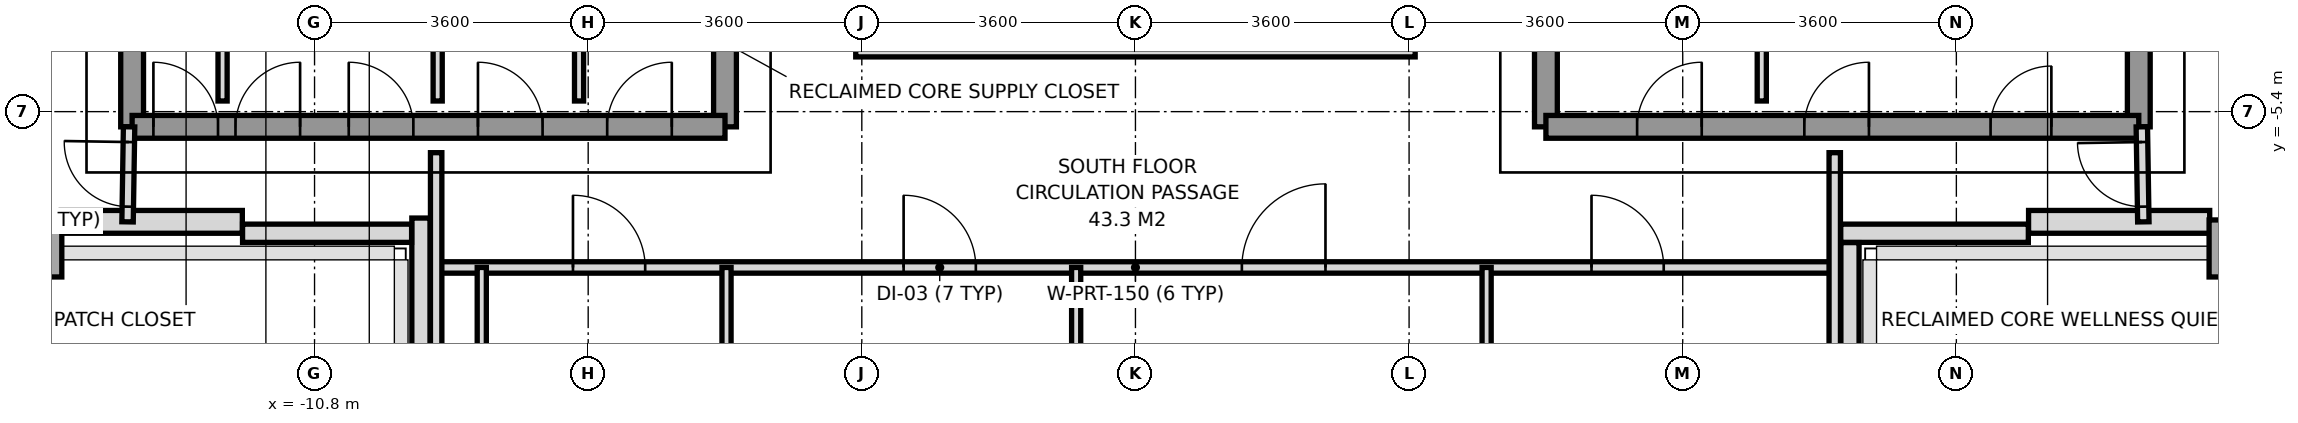
"""IFC4 building model, lengths in metres.
Left out: names, types, materials, properties, quantities, classifications, styles, units other than length and angle.
Written with IfcOpenShell. Run it as: python <this file> out.ifc"""

import sys

from ifc_helpers import new_model, si_unit, direction, frame, frame_2d, origin, origin_2d, place, context, subcontext, project, spatial, rectangle, extrude, source, transform, mapped, element, fill, save


model = new_model("IFC4")
c1 = context("Model", 3, precision=1e-05, world=origin(), true_north=direction((0.0, 1.0)))
c2 = subcontext(c1, "Body", "Model", "MODEL_VIEW")
j1 = project(units=[si_unit("LENGTHUNIT", "METRE"), si_unit("PLANEANGLEUNIT", "RADIAN")], contexts=[c1])
p1 = place(None, origin())
s1 = spatial("IfcSite", under=j1, at=p1, CompositionType="ELEMENT")
p2 = place(p1, origin())
s2 = spatial("IfcBuilding", under=s1, at=p2, CompositionType="ELEMENT")
p3 = place(p2, frame((0.0, 0.0, 223.6)))
s3 = spatial("IfcBuildingStorey", under=s2, at=p3, CompositionType="ELEMENT", Elevation=223.6)
m1 = source(origin(), c2, "Body", "SweptSolid", [
    extrude(rectangle(XDim=0.55, YDim=0.75, at=origin_2d()), origin(), (0.0, 0.0, 1.0), 3.01),
])
for number, where, z_axis, x_axis in (
    (1, (-14.4, -7.2, 0.0), (0.0, 0.0, 1.0), (1.0, 0.0, 0.0)),
    (2, (14.4, -7.2, 0.0), (0.0, 0.0, 1.0), (1.0, 0.0, 0.0)),
):
    element("IfcColumn", number, at=place(p3, frame(where, z_axis=z_axis, x_axis=x_axis)), inside=s3, PredefinedType="COLUMN", context=c2, shape_type="MappedRepresentation", body=[
        mapped(m1, transform((0.0, 0.0, 0.0), x_axis=(1.0, 0.0, 0.0), y_axis=(0.0, 1.0, 0.0), z_axis=(0.0, 0.0, 1.0), scale=1.0)),
    ])
for number, where, z_axis, x_axis in (
    (3, (-14.133, -6.85, 0.0), (0.0, 0.0, 1.0), (1.0, 0.0, 0.0)),
    (4, (11.75, -6.85, 0.0), (0.0, 0.0, 1.0), (1.0, 0.0, 0.0)),
):
    element("IfcWall", number, at=place(p3, frame(where, z_axis=z_axis, x_axis=x_axis)), inside=s3, PredefinedType="SOLIDWALL", context=c2, shape_type="SweptSolid", body=[
        extrude(rectangle(XDim=2.383, YDim=0.3, at=frame_2d((1.191, 0.0))), origin(), (0.0, 0.0, 1.0), 2.57),
    ])
p4 = place(p3, frame((11.747, -7.0, 0.0), z_axis=(0.0, 0.0, 1.0), x_axis=(-1.0, 0.0, 0.0)))
e5 = element("IfcWall", 5, at=p4, inside=s3, PredefinedType="PARAPET", context=c2, shape_type="SweptSolid", body=[
    extrude(rectangle(XDim=2.469, YDim=0.24, at=frame_2d((1.234, 0.0))), origin(), (0.0, 0.0, 1.0), 1.15),
])
p5 = place(p3, frame((9.4, -7.123, 0.0), z_axis=(0.0, 0.0, 1.0), x_axis=(0.0, -1.0, 0.0)))
e6 = element("IfcWall", 6, at=p5, inside=s3, PredefinedType="PARAPET", context=c2, shape_type="SweptSolid", body=[
    extrude(rectangle(XDim=1.499, YDim=0.24, at=frame_2d((0.75, 0.0))), origin(), (0.0, 0.0, 1.0), 1.15),
])
p6 = place(p3, frame((-9.4, -8.622, 0.0), z_axis=(0.0, 0.0, 1.0), x_axis=(0.0, 1.0, 0.0)))
e7 = element("IfcWall", 7, at=p6, inside=s3, PredefinedType="PARAPET", context=c2, shape_type="SweptSolid", body=[
    extrude(rectangle(XDim=1.822, YDim=0.24, at=frame_2d((0.911, 0.0))), origin(), (0.0, 0.0, 1.0), 1.15),
])
p7 = place(p3, frame((-9.523, -7.0, 0.0), z_axis=(0.0, 0.0, 1.0), x_axis=(-1.0, 0.0, 0.0)))
e8 = element("IfcWall", 8, at=p7, inside=s3, PredefinedType="PARAPET", context=c2, shape_type="SweptSolid", body=[
    extrude(rectangle(XDim=2.224, YDim=0.24, at=frame_2d((1.112, 0.0))), origin(), (0.0, 0.0, 1.0), 1.15),
])
p8 = place(p3, frame((-13.2, -5.6, 0.0), z_axis=(0.0, 0.0, 1.0), x_axis=(0.0, 1.0, 0.0)))
e9 = element("IfcWall", 9, at=p8, inside=s3, PredefinedType="SHEAR", context=c2, shape_type="SweptSolid", body=[
    extrude(rectangle(XDim=11.2, YDim=0.3, at=frame_2d((5.6, 0.0))), origin(), (0.0, 0.0, 1.0), 3.01),
])
p9 = place(p3, frame((-5.4, -5.6, 0.0), z_axis=(0.0, 0.0, 1.0), x_axis=(0.0, 1.0, 0.0)))
e10 = element("IfcWall", 10, at=p9, inside=s3, PredefinedType="SHEAR", context=c2, shape_type="SweptSolid", body=[
    extrude(rectangle(XDim=12.5, YDim=0.3, at=frame_2d((6.25, 0.0))), origin(), (0.0, 0.0, 1.0), 3.01),
])
p10 = place(p9, frame((4.55, 0.0, 0.0)))
e11 = element("IfcOpeningElement", 11, at=p10, cuts=e10, PredefinedType="OPENING", context=c2, shape_type="SweptSolid", body=[
    extrude(rectangle(XDim=1.2, YDim=2.2, at=frame_2d((0.6, 1.1))), frame((0.0, 0.16, 0.0), z_axis=(0.0, -1.0, 0.0), x_axis=(1.0, 0.0, 0.0)), (0.0, 0.0, 1.0), 0.32),
])
p11 = place(p9, frame((10.45, 0.0, 0.0)))
e12 = element("IfcOpeningElement", 12, at=p11, cuts=e10, PredefinedType="OPENING", context=c2, shape_type="SweptSolid", body=[
    extrude(rectangle(XDim=1.2, YDim=2.2, at=frame_2d((0.6, 1.1))), frame((0.0, 0.16, 0.0), z_axis=(0.0, -1.0, 0.0), x_axis=(1.0, 0.0, 0.0)), (0.0, 0.0, 1.0), 0.32),
])
p12 = place(p9, frame((6.86, 0.0, 0.0)))
e13 = element("IfcOpeningElement", 13, at=p12, cuts=e10, PredefinedType="OPENING", context=c2, shape_type="SweptSolid", body=[
    extrude(rectangle(XDim=0.8, YDim=2.1, at=frame_2d((0.4, 1.05))), frame((0.0, 0.16, 0.0), z_axis=(0.0, -1.0, 0.0), x_axis=(1.0, 0.0, 0.0)), (0.0, 0.0, 1.0), 0.32),
])
p13 = place(p3, frame((-13.2, -5.6, 0.0), z_axis=(0.0, 0.0, 1.0), x_axis=(1.0, 0.0, 0.0)))
e14 = element("IfcWall", 14, at=p13, inside=s3, PredefinedType="SHEAR", context=c2, shape_type="SweptSolid", body=[
    extrude(rectangle(XDim=7.8, YDim=0.3, at=frame_2d((3.9, 0.0))), origin(), (0.0, 0.0, 1.0), 3.01),
])
p14 = place(p13, frame((0.28, 0.0, 0.0)))
e15 = element("IfcOpeningElement", 15, at=p14, cuts=e14, PredefinedType="OPENING", context=c2, shape_type="SweptSolid", body=[
    extrude(rectangle(XDim=0.85, YDim=2.1, at=frame_2d((0.425, 1.05))), frame((0.0, 0.16, 0.0), z_axis=(0.0, -1.0, 0.0), x_axis=(1.0, 0.0, 0.0)), (0.0, 0.0, 1.0), 0.32),
])
p15 = place(p13, frame((1.36, 0.0, 0.0)))
e16 = element("IfcOpeningElement", 16, at=p15, cuts=e14, PredefinedType="OPENING", context=c2, shape_type="SweptSolid", body=[
    extrude(rectangle(XDim=0.85, YDim=2.1, at=frame_2d((0.425, 1.05))), frame((0.0, 0.16, 0.0), z_axis=(0.0, -1.0, 0.0), x_axis=(1.0, 0.0, 0.0)), (0.0, 0.0, 1.0), 0.32),
])
p16 = place(p13, frame((2.85, 0.0, 0.0)))
e17 = element("IfcOpeningElement", 17, at=p16, cuts=e14, PredefinedType="OPENING", context=c2, shape_type="SweptSolid", body=[
    extrude(rectangle(XDim=0.85, YDim=2.1, at=frame_2d((0.425, 1.05))), frame((0.0, 0.16, 0.0), z_axis=(0.0, -1.0, 0.0), x_axis=(1.0, 0.0, 0.0)), (0.0, 0.0, 1.0), 0.32),
])
p17 = place(p13, frame((4.55, 0.0, 0.0)))
e18 = element("IfcOpeningElement", 18, at=p17, cuts=e14, PredefinedType="OPENING", context=c2, shape_type="SweptSolid", body=[
    extrude(rectangle(XDim=0.85, YDim=2.1, at=frame_2d((0.425, 1.05))), frame((0.0, 0.16, 0.0), z_axis=(0.0, -1.0, 0.0), x_axis=(1.0, 0.0, 0.0)), (0.0, 0.0, 1.0), 0.32),
])
p18 = place(p13, frame((6.25, 0.0, 0.0)))
e19 = element("IfcOpeningElement", 19, at=p18, cuts=e14, PredefinedType="OPENING", context=c2, shape_type="SweptSolid", body=[
    extrude(rectangle(XDim=0.85, YDim=2.1, at=frame_2d((0.425, 1.05))), frame((0.0, 0.16, 0.0), z_axis=(0.0, -1.0, 0.0), x_axis=(1.0, 0.0, 0.0)), (0.0, 0.0, 1.0), 0.32),
])
p19 = place(p3, frame((13.2, -5.6, 0.0), z_axis=(0.0, 0.0, 1.0), x_axis=(0.0, 1.0, 0.0)))
e20 = element("IfcWall", 20, at=p19, inside=s3, PredefinedType="SHEAR", context=c2, shape_type="SweptSolid", body=[
    extrude(rectangle(XDim=11.2, YDim=0.3, at=frame_2d((5.6, 0.0))), origin(), (0.0, 0.0, 1.0), 3.01),
])
p20 = place(p3, frame((5.4, -5.6, 0.0), z_axis=(0.0, 0.0, 1.0), x_axis=(0.0, 1.0, 0.0)))
e21 = element("IfcWall", 21, at=p20, inside=s3, PredefinedType="SHEAR", context=c2, shape_type="SweptSolid", body=[
    extrude(rectangle(XDim=12.5, YDim=0.3, at=frame_2d((6.25, 0.0))), origin(), (0.0, 0.0, 1.0), 3.01),
])
p21 = place(p20, frame((4.55, 0.0, 0.0)))
e22 = element("IfcOpeningElement", 22, at=p21, cuts=e21, PredefinedType="OPENING", context=c2, shape_type="SweptSolid", body=[
    extrude(rectangle(XDim=1.2, YDim=2.2, at=frame_2d((0.6, 1.1))), frame((0.0, 0.16, 0.0), z_axis=(0.0, -1.0, 0.0), x_axis=(1.0, 0.0, 0.0)), (0.0, 0.0, 1.0), 0.32),
])
p22 = place(p20, frame((10.45, 0.0, 0.0)))
e23 = element("IfcOpeningElement", 23, at=p22, cuts=e21, PredefinedType="OPENING", context=c2, shape_type="SweptSolid", body=[
    extrude(rectangle(XDim=1.2, YDim=2.2, at=frame_2d((0.6, 1.1))), frame((0.0, 0.16, 0.0), z_axis=(0.0, -1.0, 0.0), x_axis=(1.0, 0.0, 0.0)), (0.0, 0.0, 1.0), 0.32),
])
p23 = place(p20, frame((6.86, 0.0, 0.0)))
e24 = element("IfcOpeningElement", 24, at=p23, cuts=e21, PredefinedType="OPENING", context=c2, shape_type="SweptSolid", body=[
    extrude(rectangle(XDim=0.8, YDim=2.1, at=frame_2d((0.4, 1.05))), frame((0.0, 0.16, 0.0), z_axis=(0.0, -1.0, 0.0), x_axis=(1.0, 0.0, 0.0)), (0.0, 0.0, 1.0), 0.32),
])
p24 = place(p20, frame((7.88, 0.0, 0.0)))
e25 = element("IfcOpeningElement", 25, at=p24, cuts=e21, PredefinedType="OPENING", context=c2, shape_type="SweptSolid", body=[
    extrude(rectangle(XDim=0.8, YDim=2.1, at=frame_2d((0.4, 1.05))), frame((0.0, 0.16, 0.0), z_axis=(0.0, -1.0, 0.0), x_axis=(1.0, 0.0, 0.0)), (0.0, 0.0, 1.0), 0.32),
])
p25 = place(p3, frame((5.4, -5.6, 0.0), z_axis=(0.0, 0.0, 1.0), x_axis=(1.0, 0.0, 0.0)))
e26 = element("IfcWall", 26, at=p25, inside=s3, PredefinedType="SHEAR", context=c2, shape_type="SweptSolid", body=[
    extrude(rectangle(XDim=7.8, YDim=0.3, at=frame_2d((3.9, 0.0))), origin(), (0.0, 0.0, 1.0), 3.01),
])
p26 = place(p25, frame((5.85, 0.0, 0.0)))
e27 = element("IfcOpeningElement", 27, at=p26, cuts=e26, PredefinedType="OPENING", context=c2, shape_type="SweptSolid", body=[
    extrude(rectangle(XDim=0.8, YDim=2.1, at=frame_2d((0.4, 1.05))), frame((0.0, 0.16, 0.0), z_axis=(0.0, -1.0, 0.0), x_axis=(1.0, 0.0, 0.0)), (0.0, 0.0, 1.0), 0.32),
])
p27 = place(p25, frame((1.2, 0.0, 0.0)))
e28 = element("IfcOpeningElement", 28, at=p27, cuts=e26, PredefinedType="OPENING", context=c2, shape_type="SweptSolid", body=[
    extrude(rectangle(XDim=0.85, YDim=2.1, at=frame_2d((0.425, 1.05))), frame((0.0, 0.16, 0.0), z_axis=(0.0, -1.0, 0.0), x_axis=(1.0, 0.0, 0.0)), (0.0, 0.0, 1.0), 0.32),
])
p28 = place(p25, frame((3.4, 0.0, 0.0)))
e29 = element("IfcOpeningElement", 29, at=p28, cuts=e26, PredefinedType="OPENING", context=c2, shape_type="SweptSolid", body=[
    extrude(rectangle(XDim=0.85, YDim=2.1, at=frame_2d((0.425, 1.05))), frame((0.0, 0.16, 0.0), z_axis=(0.0, -1.0, 0.0), x_axis=(1.0, 0.0, 0.0)), (0.0, 0.0, 1.0), 0.32),
])
for number, where, z_axis, x_axis in (
    (30, (-12.01, -5.26, 0.0), (0.0, 0.0, 1.0), (0.0, 1.0, 0.0)),
    (31, (-9.18, -5.26, 0.0), (0.0, 0.0, 1.0), (0.0, 1.0, 0.0)),
    (32, (-7.32, -5.26, 0.0), (0.0, 0.0, 1.0), (0.0, 1.0, 0.0)),
    (33, (8.24, -5.26, 0.0), (0.0, 0.0, 1.0), (0.0, 1.0, 0.0)),
):
    element("IfcWall", number, at=place(p3, frame(where, z_axis=z_axis, x_axis=x_axis)), inside=s3, PredefinedType="PARTITIONING", context=c2, shape_type="SweptSolid", body=[
        extrude(rectangle(XDim=2.94, YDim=0.12, at=frame_2d((1.47, 0.0))), origin(), (0.0, 0.0, 1.0), 3.01),
    ])
p29 = place(p3, frame((-9.2, -7.45, 0.0), z_axis=(0.0, 0.0, 1.0), x_axis=(1.0, 0.0, 0.0)))
e34 = element("IfcWall", 34, at=p29, inside=s3, PredefinedType="PARTITIONING", context=c2, shape_type="SweptSolid", body=[
    extrude(rectangle(XDim=18.4, YDim=0.15, at=frame_2d((9.2, 0.0))), origin(), (0.0, 0.0, 1.0), 2.57),
])
p30 = place(p29, frame((1.8, 0.0, 0.0)))
e35 = element("IfcOpeningElement", 35, at=p30, cuts=e34, PredefinedType="OPENING", context=c2, shape_type="SweptSolid", body=[
    extrude(rectangle(XDim=0.95, YDim=2.15, at=frame_2d((0.475, 1.075))), frame((0.0, 0.085, 0.0), z_axis=(0.0, -1.0, 0.0), x_axis=(1.0, 0.0, 0.0)), (0.0, 0.0, 1.0), 0.17),
])
p31 = place(p29, frame((6.15, 0.0, 0.0)))
e36 = element("IfcOpeningElement", 36, at=p31, cuts=e34, PredefinedType="OPENING", context=c2, shape_type="SweptSolid", body=[
    extrude(rectangle(XDim=0.95, YDim=2.15, at=frame_2d((0.475, 1.075))), frame((0.0, 0.085, 0.0), z_axis=(0.0, -1.0, 0.0), x_axis=(1.0, 0.0, 0.0)), (0.0, 0.0, 1.0), 0.17),
])
p32 = place(p29, frame((10.6, 0.0, 0.0)))
e37 = element("IfcOpeningElement", 37, at=p32, cuts=e34, PredefinedType="OPENING", context=c2, shape_type="SweptSolid", body=[
    extrude(rectangle(XDim=1.1, YDim=2.2, at=frame_2d((0.55, 1.1))), frame((0.0, 0.085, 0.0), z_axis=(0.0, -1.0, 0.0), x_axis=(1.0, 0.0, 0.0)), (0.0, 0.0, 1.0), 0.17),
])
p33 = place(p29, frame((15.2, 0.0, 0.0)))
e38 = element("IfcOpeningElement", 38, at=p33, cuts=e34, PredefinedType="OPENING", context=c2, shape_type="SweptSolid", body=[
    extrude(rectangle(XDim=0.95, YDim=2.15, at=frame_2d((0.475, 1.075))), frame((0.0, 0.085, 0.0), z_axis=(0.0, -1.0, 0.0), x_axis=(1.0, 0.0, 0.0)), (0.0, 0.0, 1.0), 0.17),
])
for number, where, z_axis, x_axis in (
    (39, (-9.2, -10.28, 0.0), (0.0, 0.0, 1.0), (0.0, 1.0, 0.0)),
    (40, (9.2, -10.28, 0.0), (0.0, 0.0, 1.0), (0.0, 1.0, 0.0)),
):
    element("IfcWall", number, at=place(p3, frame(where, z_axis=z_axis, x_axis=x_axis)), inside=s3, PredefinedType="PARTITIONING", context=c2, shape_type="SweptSolid", body=[
        extrude(rectangle(XDim=4.34, YDim=0.15, at=frame_2d((2.17, 0.0))), origin(), (0.0, 0.0, 1.0), 2.61),
    ])
p34 = place(p3, frame((-5.38, -19.25, 0.0), z_axis=(0.0, 0.0, 1.0), x_axis=(0.0, 1.0, 0.0)))
e41 = element("IfcWall", 41, at=p34, inside=s3, PredefinedType="PARTITIONING", context=c2, shape_type="SweptSolid", body=[
    extrude(rectangle(XDim=11.8, YDim=0.12, at=frame_2d((5.9, 0.0))), origin(), (0.0, 0.0, 1.0), 2.61),
])
p35 = place(p34, frame((3.2, 0.0, 0.0)))
e42 = element("IfcOpeningElement", 42, at=p35, cuts=e41, PredefinedType="OPENING", context=c2, shape_type="SweptSolid", body=[
    extrude(rectangle(XDim=0.95, YDim=2.15, at=frame_2d((0.475, 1.075))), frame((0.0, 0.07, 0.0), z_axis=(0.0, -1.0, 0.0), x_axis=(1.0, 0.0, 0.0)), (0.0, 0.0, 1.0), 0.14),
])
for number, where, z_axis, x_axis in (
    (43, (-0.78, -19.25, 0.0), (0.0, 0.0, 1.0), (0.0, 1.0, 0.0)),
    (44, (4.62, -19.25, 0.0), (0.0, 0.0, 1.0), (0.0, 1.0, 0.0)),
):
    element("IfcWall", number, at=place(p3, frame(where, z_axis=z_axis, x_axis=x_axis)), inside=s3, PredefinedType="PARTITIONING", context=c2, shape_type="SweptSolid", body=[
        extrude(rectangle(XDim=11.8, YDim=0.12, at=frame_2d((5.9, 0.0))), origin(), (0.0, 0.0, 1.0), 2.61),
    ])
p36 = place(p3, frame((-8.6, -11.05, 0.0), z_axis=(0.0, 0.0, 1.0), x_axis=(0.0, 1.0, 0.0)))
e45 = element("IfcWall", 45, at=p36, inside=s3, PredefinedType="PARTITIONING", context=c2, shape_type="SweptSolid", body=[
    extrude(rectangle(XDim=3.6, YDim=0.12, at=frame_2d((1.8, 0.0))), origin(), (0.0, 0.0, 1.0), 2.61),
])
p37 = place(p3, frame((-13.26, -6.85, 0.0), z_axis=(0.0, 0.0, 1.0), x_axis=(0.016013571389, 0.999871774545, 0.0)))
e46 = element("IfcWall", 46, at=p37, inside=s3, PredefinedType="PARTITIONING", context=c2, shape_type="SweptSolid", body=[
    extrude(rectangle(XDim=1.25, YDim=0.15, at=frame_2d((0.625, 0.0))), origin(), (0.0, 0.0, 1.0), 3.01),
])
p38 = place(p37, frame((0.2, 0.0, 0.0)))
e47 = element("IfcOpeningElement", 47, at=p38, cuts=e46, PredefinedType="OPENING", context=c2, shape_type="SweptSolid", body=[
    extrude(rectangle(XDim=0.85, YDim=2.1, at=frame_2d((0.425, 1.05))), frame((0.0, 0.085, 0.0), z_axis=(0.0, -1.0, 0.0), x_axis=(1.0, 0.0, 0.0)), (0.0, 0.0, 1.0), 0.17),
])
p39 = place(p3, frame((13.26, -6.85, 0.0), z_axis=(0.0, 0.0, 1.0), x_axis=(-0.016013571389, 0.999871774545, 0.0)))
e48 = element("IfcWall", 48, at=p39, inside=s3, PredefinedType="PARTITIONING", context=c2, shape_type="SweptSolid", body=[
    extrude(rectangle(XDim=1.25, YDim=0.15, at=frame_2d((0.625, 0.0))), origin(), (0.0, 0.0, 1.0), 3.01),
])
p40 = place(p39, frame((0.2, 0.0, 0.0)))
e49 = element("IfcOpeningElement", 49, at=p40, cuts=e48, PredefinedType="OPENING", context=c2, shape_type="SweptSolid", body=[
    extrude(rectangle(XDim=0.85, YDim=2.1, at=frame_2d((0.425, 1.05))), frame((0.0, 0.085, 0.0), z_axis=(0.0, -1.0, 0.0), x_axis=(1.0, 0.0, 0.0)), (0.0, 0.0, 1.0), 0.17),
])
p41 = place(p3, frame((-3.68, -4.56, 0.0), z_axis=(0.0, 0.0, 1.0), x_axis=(1.0, 0.0, 0.0)))
e50 = element("IfcWall", 50, at=p41, inside=s3, PredefinedType="PARAPET", context=c2, shape_type="SweptSolid", body=[
    extrude(rectangle(XDim=7.36, YDim=0.24, at=frame_2d((3.68, 0.0))), origin(), (0.0, 0.0, 1.0), 1.15),
])
m2 = source(origin(), c2, "Body", "SweptSolid", [
    extrude(rectangle(XDim=0.85, YDim=2.1, at=frame_2d((0.425, 1.05))), frame((0.0, 0.025, 0.0), z_axis=(0.0, -1.0, 0.0), x_axis=(1.0, 0.0, 0.0)), (0.0, 0.0, 1.0), 0.05),
])
p42 = place(p14, origin())
e51 = element("IfcDoor", 51, at=p42, inside=s3, OperationType="SINGLE_SWING_LEFT", PredefinedType="DOOR", context=c2, shape_type="MappedRepresentation", body=[
    mapped(m2, transform((0.0, 0.0, 0.0), x_axis=(1.0, 0.0, 0.0), y_axis=(0.0, 1.0, 0.0), z_axis=(0.0, 0.0, 1.0), scale=1.0)),
])
fill(e15, e51)
p43 = place(p15, origin())
e52 = element("IfcDoor", 52, at=p43, inside=s3, OperationType="SINGLE_SWING_RIGHT", PredefinedType="DOOR", context=c2, shape_type="MappedRepresentation", body=[
    mapped(m2, transform((0.0, 0.0, 0.0), x_axis=(1.0, 0.0, 0.0), y_axis=(0.0, 1.0, 0.0), z_axis=(0.0, 0.0, 1.0), scale=1.0)),
])
fill(e16, e52)
m3 = source(origin(), c2, "Body", "SweptSolid", [
    extrude(rectangle(XDim=0.8, YDim=2.1, at=frame_2d((0.4, 1.05))), frame((0.0, 0.025, 0.0), z_axis=(0.0, -1.0, 0.0), x_axis=(1.0, 0.0, 0.0)), (0.0, 0.0, 1.0), 0.05),
])
p44 = place(p26, origin())
e53 = element("IfcDoor", 53, at=p44, inside=s3, OperationType="SINGLE_SWING_RIGHT", PredefinedType="DOOR", context=c2, shape_type="MappedRepresentation", body=[
    mapped(m3, transform((0.0, 0.0, 0.0), x_axis=(1.0, 0.0, 0.0), y_axis=(0.0, 1.0, 0.0), z_axis=(0.0, 0.0, 1.0), scale=1.0)),
])
fill(e27, e53)
p45 = place(p16, origin())
e54 = element("IfcDoor", 54, at=p45, inside=s3, OperationType="SINGLE_SWING_LEFT", PredefinedType="DOOR", context=c2, shape_type="MappedRepresentation", body=[
    mapped(m2, transform((0.0, 0.0, 0.0), x_axis=(1.0, 0.0, 0.0), y_axis=(0.0, 1.0, 0.0), z_axis=(0.0, 0.0, 1.0), scale=1.0)),
])
fill(e17, e54)
p46 = place(p17, origin())
e55 = element("IfcDoor", 55, at=p46, inside=s3, OperationType="SINGLE_SWING_LEFT", PredefinedType="DOOR", context=c2, shape_type="MappedRepresentation", body=[
    mapped(m2, transform((0.0, 0.0, 0.0), x_axis=(1.0, 0.0, 0.0), y_axis=(0.0, 1.0, 0.0), z_axis=(0.0, 0.0, 1.0), scale=1.0)),
])
fill(e18, e55)
p47 = place(p18, origin())
e56 = element("IfcDoor", 56, at=p47, inside=s3, OperationType="SINGLE_SWING_RIGHT", PredefinedType="DOOR", context=c2, shape_type="MappedRepresentation", body=[
    mapped(m2, transform((0.0, 0.0, 0.0), x_axis=(1.0, 0.0, 0.0), y_axis=(0.0, 1.0, 0.0), z_axis=(0.0, 0.0, 1.0), scale=1.0)),
])
fill(e19, e56)
p48 = place(p27, origin())
e57 = element("IfcDoor", 57, at=p48, inside=s3, OperationType="SINGLE_SWING_RIGHT", PredefinedType="DOOR", context=c2, shape_type="MappedRepresentation", body=[
    mapped(m2, transform((0.0, 0.0, 0.0), x_axis=(1.0, 0.0, 0.0), y_axis=(0.0, 1.0, 0.0), z_axis=(0.0, 0.0, 1.0), scale=1.0)),
])
fill(e28, e57)
p49 = place(p28, origin())
e58 = element("IfcDoor", 58, at=p49, inside=s3, OperationType="SINGLE_SWING_RIGHT", PredefinedType="DOOR", context=c2, shape_type="MappedRepresentation", body=[
    mapped(m2, transform((0.0, 0.0, 0.0), x_axis=(1.0, 0.0, 0.0), y_axis=(0.0, 1.0, 0.0), z_axis=(0.0, 0.0, 1.0), scale=1.0)),
])
fill(e29, e58)
m4 = source(origin(), c2, "Body", "SweptSolid", [
    extrude(rectangle(XDim=0.95, YDim=2.15, at=frame_2d((0.475, 1.075))), frame((0.0, 0.025, 0.0), z_axis=(0.0, -1.0, 0.0), x_axis=(1.0, 0.0, 0.0)), (0.0, 0.0, 1.0), 0.05),
])
p50 = place(p30, origin())
e59 = element("IfcDoor", 59, at=p50, inside=s3, OperationType="SINGLE_SWING_LEFT", PredefinedType="DOOR", context=c2, shape_type="MappedRepresentation", body=[
    mapped(m4, transform((0.0, 0.0, 0.0), x_axis=(1.0, 0.0, 0.0), y_axis=(0.0, 1.0, 0.0), z_axis=(0.0, 0.0, 1.0), scale=1.0)),
])
fill(e35, e59)
p51 = place(p31, origin())
e60 = element("IfcDoor", 60, at=p51, inside=s3, OperationType="SINGLE_SWING_LEFT", PredefinedType="DOOR", context=c2, shape_type="MappedRepresentation", body=[
    mapped(m4, transform((0.0, 0.0, 0.0), x_axis=(1.0, 0.0, 0.0), y_axis=(0.0, 1.0, 0.0), z_axis=(0.0, 0.0, 1.0), scale=1.0)),
])
fill(e36, e60)
m5 = source(origin(), c2, "Body", "SweptSolid", [
    extrude(rectangle(XDim=1.1, YDim=2.2, at=frame_2d((0.55, 1.1))), frame((0.0, 0.025, 0.0), z_axis=(0.0, -1.0, 0.0), x_axis=(1.0, 0.0, 0.0)), (0.0, 0.0, 1.0), 0.05),
])
p52 = place(p32, origin())
e61 = element("IfcDoor", 61, at=p52, inside=s3, OperationType="SINGLE_SWING_RIGHT", PredefinedType="DOOR", context=c2, shape_type="MappedRepresentation", body=[
    mapped(m5, transform((0.0, 0.0, 0.0), x_axis=(1.0, 0.0, 0.0), y_axis=(0.0, 1.0, 0.0), z_axis=(0.0, 0.0, 1.0), scale=1.0)),
])
fill(e37, e61)
p53 = place(p33, origin())
e62 = element("IfcDoor", 62, at=p53, inside=s3, OperationType="SINGLE_SWING_LEFT", PredefinedType="DOOR", context=c2, shape_type="MappedRepresentation", body=[
    mapped(m4, transform((0.0, 0.0, 0.0), x_axis=(1.0, 0.0, 0.0), y_axis=(0.0, 1.0, 0.0), z_axis=(0.0, 0.0, 1.0), scale=1.0)),
])
fill(e38, e62)
p54 = place(p38, origin())
e63 = element("IfcDoor", 63, at=p54, inside=s3, OperationType="SINGLE_SWING_RIGHT", PredefinedType="DOOR", context=c2, shape_type="MappedRepresentation", body=[
    mapped(m2, transform((0.0, 0.0, 0.0), x_axis=(1.0, 0.0, 0.0), y_axis=(0.0, 1.0, 0.0), z_axis=(0.0, 0.0, 1.0), scale=1.0)),
])
fill(e47, e63)
p55 = place(p40, origin())
e64 = element("IfcDoor", 64, at=p55, inside=s3, OperationType="SINGLE_SWING_RIGHT", PredefinedType="DOOR", context=c2, shape_type="MappedRepresentation", body=[
    mapped(m2, transform((0.0, 0.0, 0.0), x_axis=(1.0, 0.0, 0.0), y_axis=(0.0, 1.0, 0.0), z_axis=(0.0, 0.0, 1.0), scale=1.0)),
])
fill(e49, e64)
save(model, sys.argv[1])
